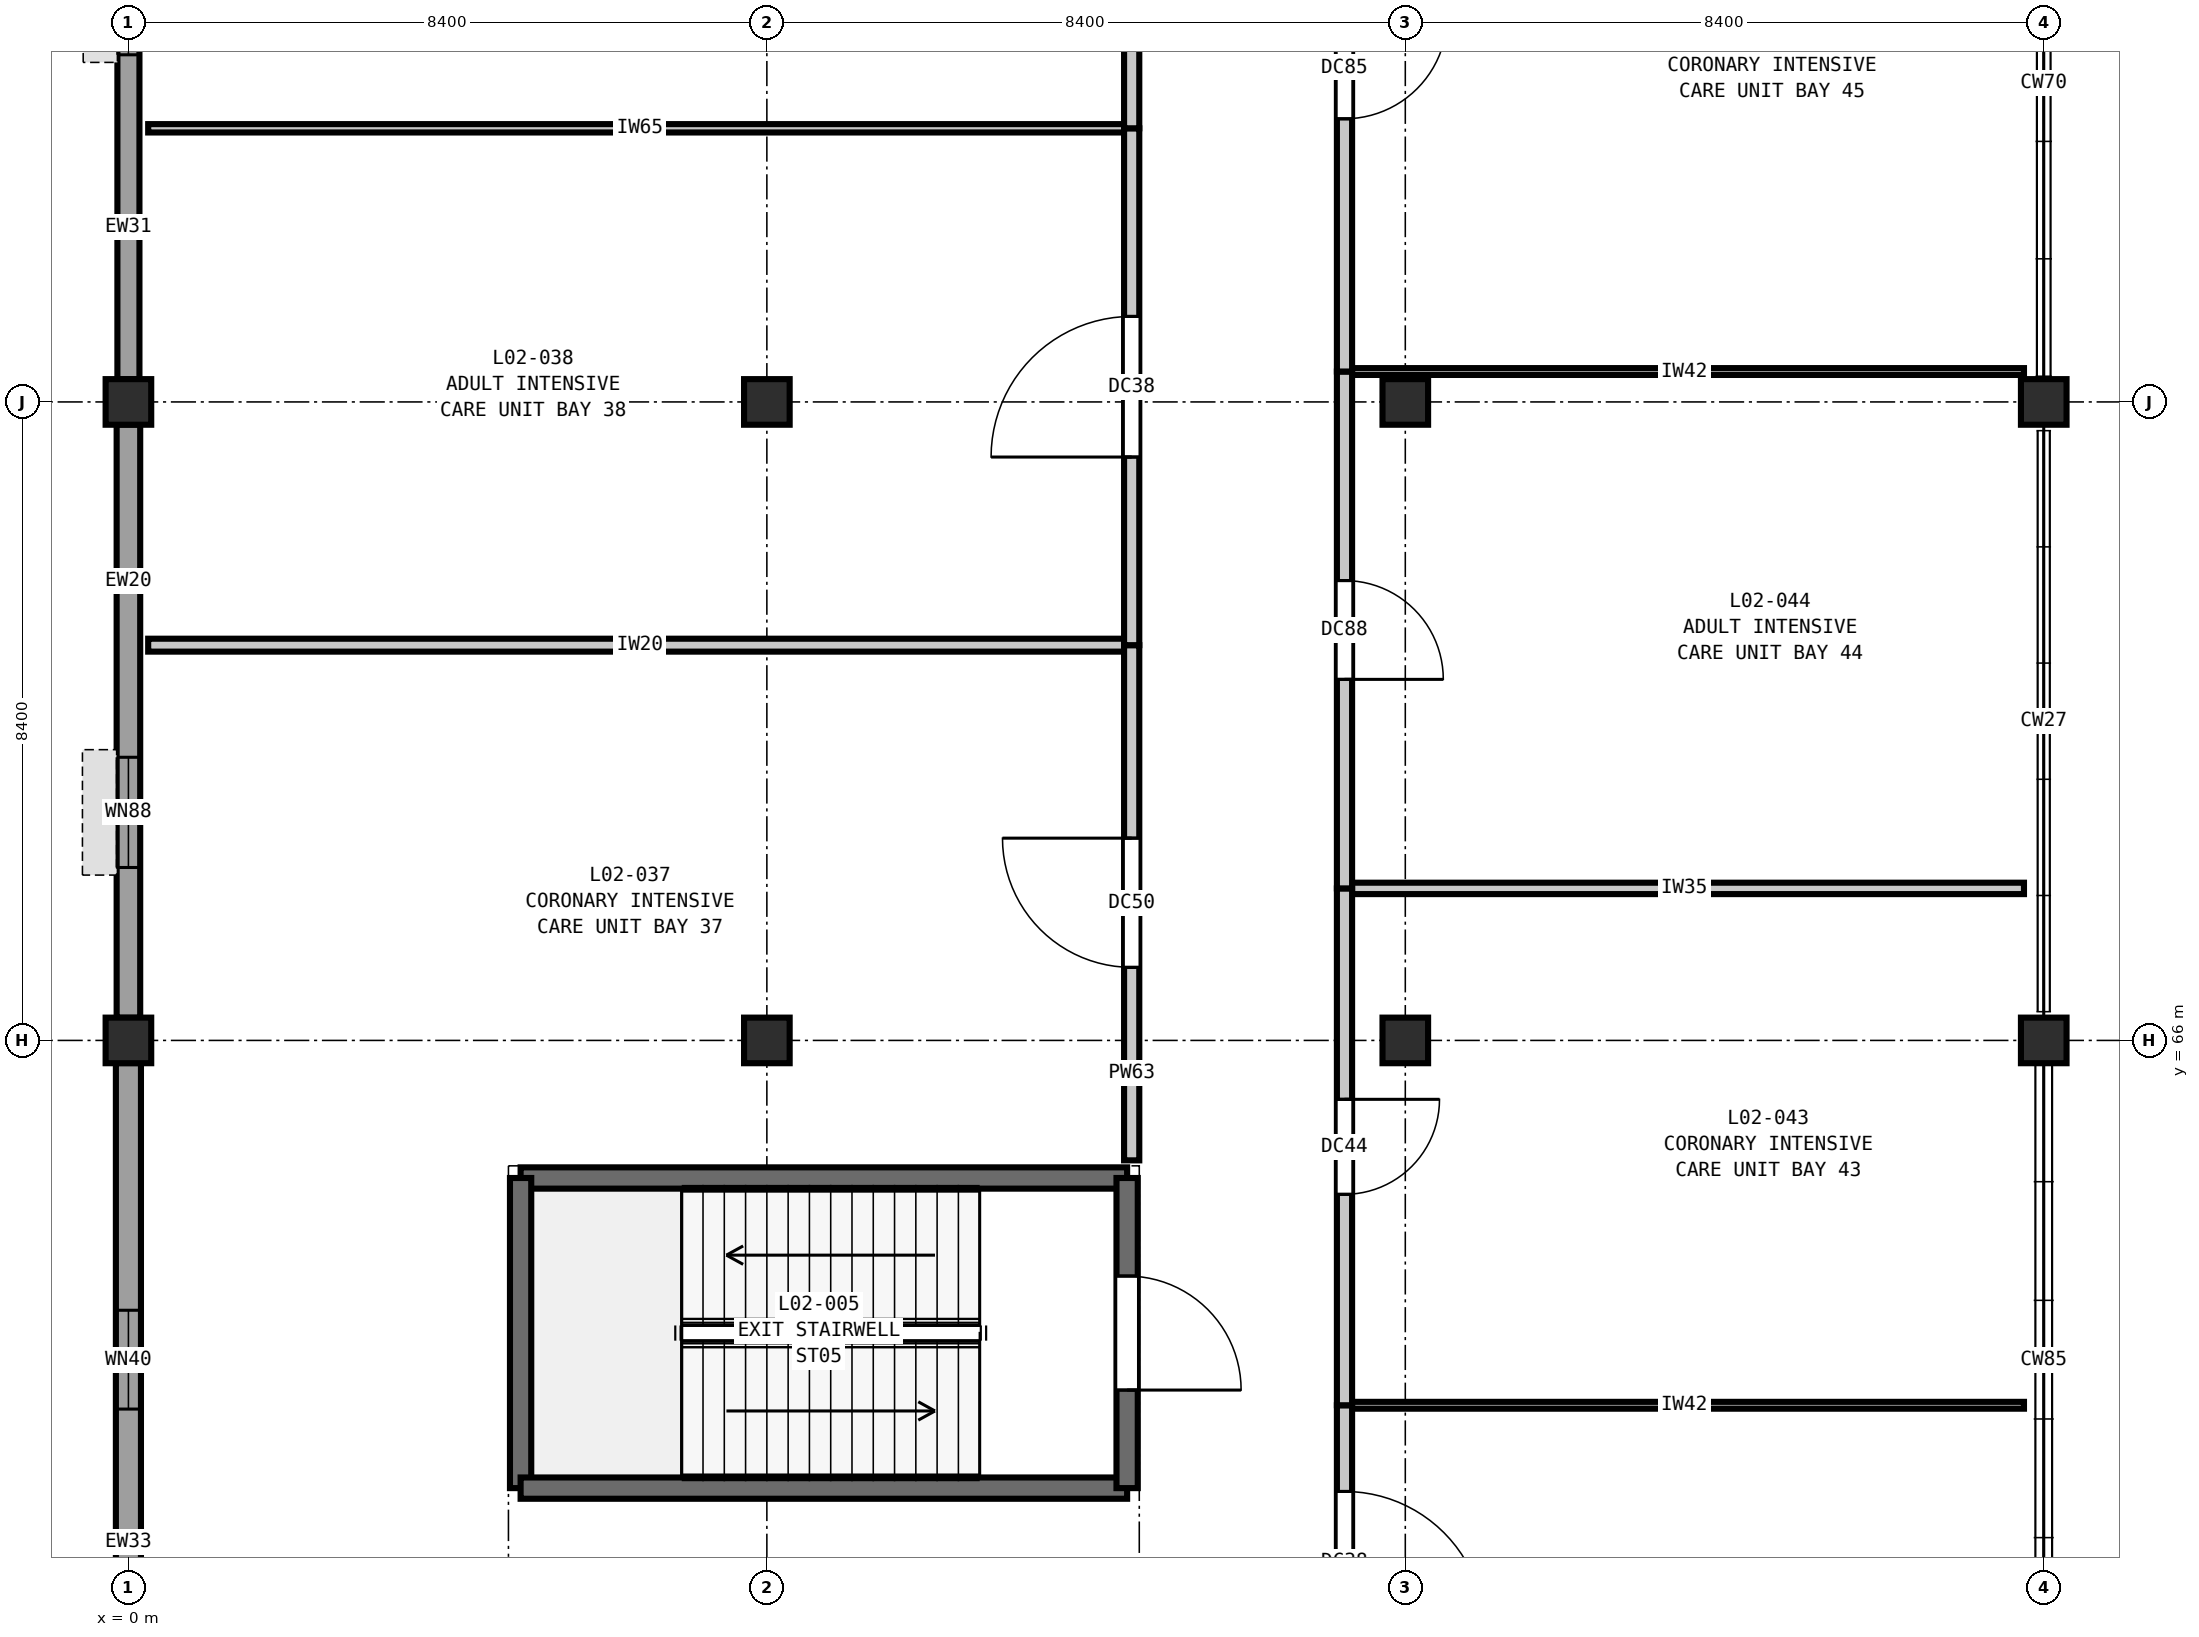
"""IFC4 building model, lengths in metres.
Left out: names, types, materials, properties, quantities, classifications, styles, units other than length and angle.
Written with IfcOpenShell. Run it as: python <this file> out.ifc"""

import sys

from ifc_helpers import new_model, si_unit, direction, frame, frame_2d, origin, origin_2d, place, context, subcontext, project, spatial, rectangle, extrude, element, fill, save


model = new_model("IFC4")
c1 = context("Model", 3, precision=1e-05, world=origin(), true_north=direction((0.0, 1.0)))
c2 = subcontext(c1, "Body", "Model", "MODEL_VIEW")
j1 = project(units=[si_unit("LENGTHUNIT", "METRE"), si_unit("PLANEANGLEUNIT", "RADIAN")], contexts=[c1])
p1 = place(None, origin())
s1 = spatial("IfcSite", under=j1, at=p1, CompositionType="ELEMENT")
p2 = place(p1, origin())
s2 = spatial("IfcBuilding", under=s1, at=p2, CompositionType="ELEMENT")
p3 = place(p2, frame((0.0, 0.0, 10.8)))
s3 = spatial("IfcBuildingStorey", under=s2, at=p3, CompositionType="ELEMENT", Elevation=10.8)
for number, where, z_axis, x_axis in (
    (1, (0.0, 66.0, 0.0), (0.0, 0.0, 1.0), (1.0, 0.0, 0.0)),
    (2, (0.0, 74.4, 0.0), (0.0, 0.0, 1.0), (1.0, 0.0, 0.0)),
    (3, (8.4, 66.0, 0.0), (0.0, 0.0, 1.0), (1.0, 0.0, 0.0)),
    (4, (8.4, 74.4, 0.0), (0.0, 0.0, 1.0), (1.0, 0.0, 0.0)),
    (5, (16.8, 66.0, 0.0), (0.0, 0.0, 1.0), (1.0, 0.0, 0.0)),
    (6, (16.8, 74.4, 0.0), (0.0, 0.0, 1.0), (1.0, 0.0, 0.0)),
    (7, (25.2, 66.0, 0.0), (0.0, 0.0, 1.0), (1.0, 0.0, 0.0)),
    (8, (25.2, 74.4, 0.0), (0.0, 0.0, 1.0), (1.0, 0.0, 0.0)),
):
    element("IfcColumn", number, at=place(p3, frame(where, z_axis=z_axis, x_axis=x_axis)), inside=s3, PredefinedType="COLUMN", context=c2, shape_type="SweptSolid", body=[
        extrude(rectangle(XDim=0.6, YDim=0.6, at=origin_2d()), origin(), (0.0, 0.0, 1.0), 5.4),
    ])
p4 = place(p3, frame((0.0, 57.898, 0.0), z_axis=(0.0, 0.0, 1.0), x_axis=(0.0, 1.0, 0.0)))
e9 = element("IfcWall", 9, at=p4, inside=s3, PredefinedType="SOLIDWALL", context=c2, shape_type="SweptSolid", body=[
    extrude(rectangle(XDim=7.804, YDim=0.33, at=frame_2d((3.902, 0.0))), origin(), (0.0, 0.0, 1.0), 4.68),
])
p5 = place(p4, frame((3.252, 0.0, 0.9)))
e10 = element("IfcOpeningElement", 10, at=p5, cuts=e9, PredefinedType="OPENING", context=c2, shape_type="SweptSolid", body=[
    extrude(rectangle(XDim=1.3, YDim=1.75, at=frame_2d((0.65, 0.875))), frame((0.0, 0.175, 0.0), z_axis=(0.0, -1.0, 0.0), x_axis=(1.0, 0.0, 0.0)), (0.0, 0.0, 1.0), 0.35),
])
p6 = place(p3, frame((0.0, 66.298, 0.0), z_axis=(0.0, 0.0, 1.0), x_axis=(0.0, 1.0, 0.0)))
e11 = element("IfcWall", 11, at=p6, inside=s3, PredefinedType="SOLIDWALL", context=c2, shape_type="SweptSolid", body=[
    extrude(rectangle(XDim=7.804, YDim=0.31, at=frame_2d((3.902, 0.0))), origin(), (0.0, 0.0, 1.0), 4.68),
])
p7 = place(p6, frame((1.977, 0.0, 0.9)))
e12 = element("IfcOpeningElement", 12, at=p7, cuts=e11, PredefinedType="OPENING", context=c2, shape_type="SweptSolid", body=[
    extrude(rectangle(XDim=1.45, YDim=1.75, at=frame_2d((0.725, 0.875))), frame((0.0, 0.165, 0.0), z_axis=(0.0, -1.0, 0.0), x_axis=(1.0, 0.0, 0.0)), (0.0, 0.0, 1.0), 0.33),
])
p8 = place(p3, frame((0.0, 74.698, 0.0), z_axis=(0.0, 0.0, 1.0), x_axis=(0.0, 1.0, 0.0)))
e13 = element("IfcWall", 13, at=p8, inside=s3, PredefinedType="SOLIDWALL", context=c2, shape_type="SweptSolid", body=[
    extrude(rectangle(XDim=7.804, YDim=0.29, at=frame_2d((3.902, 0.0))), origin(), (0.0, 0.0, 1.0), 4.68),
])
p9 = place(p8, frame((4.269, 0.0, 0.9)))
e14 = element("IfcOpeningElement", 14, at=p9, cuts=e13, PredefinedType="OPENING", context=c2, shape_type="SweptSolid", body=[
    extrude(rectangle(XDim=1.6, YDim=1.75, at=frame_2d((0.8, 0.875))), frame((0.0, 0.155, 0.0), z_axis=(0.0, -1.0, 0.0), x_axis=(1.0, 0.0, 0.0)), (0.0, 0.0, 1.0), 0.31),
])
p10 = place(p3, frame((13.14, 64.19, 0.0), z_axis=(0.0, 0.0, 1.0), x_axis=(-1.0, 0.0, 0.0)))
e15 = element("IfcWall", 15, at=p10, inside=s3, PredefinedType="SHEAR", context=c2, shape_type="SweptSolid", body=[
    extrude(rectangle(XDim=7.98, YDim=0.28, at=frame_2d((3.99, 0.0))), origin(), (0.0, 0.0, 1.0), 5.4),
])
p11 = place(p3, frame((5.16, 64.19, 0.0), z_axis=(0.0, 0.0, 1.0), x_axis=(0.0, -1.0, 0.0)))
e16 = element("IfcWall", 16, at=p11, inside=s3, PredefinedType="SHEAR", context=c2, shape_type="SweptSolid", body=[
    extrude(rectangle(XDim=4.08, YDim=0.28, at=frame_2d((2.04, 0.0))), origin(), (0.0, 0.0, 1.0), 5.4),
])
p12 = place(p3, frame((5.16, 60.11, 0.0), z_axis=(0.0, 0.0, 1.0), x_axis=(1.0, 0.0, 0.0)))
e17 = element("IfcWall", 17, at=p12, inside=s3, PredefinedType="SHEAR", context=c2, shape_type="SweptSolid", body=[
    extrude(rectangle(XDim=7.98, YDim=0.28, at=frame_2d((3.99, 0.0))), origin(), (0.0, 0.0, 1.0), 5.4),
])
p13 = place(p3, frame((13.14, 60.11, 0.0), z_axis=(0.0, 0.0, 1.0), x_axis=(0.0, 1.0, 0.0)))
e18 = element("IfcWall", 18, at=p13, inside=s3, PredefinedType="SHEAR", context=c2, shape_type="SweptSolid", body=[
    extrude(rectangle(XDim=4.08, YDim=0.28, at=frame_2d((2.04, 0.0))), origin(), (0.0, 0.0, 1.0), 5.4),
])
p14 = place(p13, frame((1.29, 0.0, 0.0)))
e19 = element("IfcOpeningElement", 19, at=p14, cuts=e18, PredefinedType="OPENING", context=c2, shape_type="SweptSolid", body=[
    extrude(rectangle(XDim=1.5, YDim=2.2, at=frame_2d((0.75, 1.1))), frame((0.0, 0.15, 0.0), z_axis=(0.0, -1.0, 0.0), x_axis=(1.0, 0.0, 0.0)), (0.0, 0.0, 1.0), 0.3),
])
p15 = place(p3, frame((16.0, 61.2, 0.0), z_axis=(0.0, 0.0, 1.0), x_axis=(1.0, 0.0, 0.0)))
e20 = element("IfcWall", 20, at=p15, inside=s3, PredefinedType="PARTITIONING", context=c2, shape_type="SweptSolid", body=[
    extrude(rectangle(XDim=8.94, YDim=0.09, at=frame_2d((4.47, 0.0))), origin(), (0.0, 0.0, 1.0), 5.07),
])
p16 = place(p3, frame((16.0, 68.0, 0.0), z_axis=(0.0, 0.0, 1.0), x_axis=(1.0, 0.0, 0.0)))
e21 = element("IfcWall", 21, at=p16, inside=s3, PredefinedType="PARTITIONING", context=c2, shape_type="SweptSolid", body=[
    extrude(rectangle(XDim=8.94, YDim=0.15, at=frame_2d((4.47, 0.0))), origin(), (0.0, 0.0, 1.0), 5.07),
])
p17 = place(p3, frame((0.26, 71.2, 0.0), z_axis=(0.0, 0.0, 1.0), x_axis=(1.0, 0.0, 0.0)))
e22 = element("IfcWall", 22, at=p17, inside=s3, PredefinedType="PARTITIONING", context=c2, shape_type="SweptSolid", body=[
    extrude(rectangle(XDim=12.94, YDim=0.17, at=frame_2d((6.47, 0.0))), origin(), (0.0, 0.0, 1.0), 5.07),
])
p18 = place(p3, frame((16.0, 74.8, 0.0), z_axis=(0.0, 0.0, 1.0), x_axis=(1.0, 0.0, 0.0)))
e23 = element("IfcWall", 23, at=p18, inside=s3, PredefinedType="PARTITIONING", context=c2, shape_type="SweptSolid", body=[
    extrude(rectangle(XDim=8.94, YDim=0.09, at=frame_2d((4.47, 0.0))), origin(), (0.0, 0.0, 1.0), 5.07),
])
p19 = place(p3, frame((0.26, 78.0, 0.0), z_axis=(0.0, 0.0, 1.0), x_axis=(1.0, 0.0, 0.0)))
e24 = element("IfcWall", 24, at=p19, inside=s3, PredefinedType="PARTITIONING", context=c2, shape_type="SweptSolid", body=[
    extrude(rectangle(XDim=12.94, YDim=0.11, at=frame_2d((6.47, 0.0))), origin(), (0.0, 0.0, 1.0), 5.07),
])
p20 = place(p3, frame((13.2, 64.422, 0.0), z_axis=(0.0, 0.0, 1.0), x_axis=(0.0, 1.0, 0.0)))
e25 = element("IfcWall", 25, at=p20, inside=s3, PredefinedType="PARTITIONING", context=c2, shape_type="SweptSolid", body=[
    extrude(rectangle(XDim=6.778, YDim=0.2, at=frame_2d((3.389, 0.0))), origin(), (0.0, 0.0, 1.0), 5.07),
])
p21 = place(p20, frame((2.539, 0.0, 0.0)))
e26 = element("IfcOpeningElement", 26, at=p21, cuts=e25, PredefinedType="OPENING", context=c2, shape_type="SweptSolid", body=[
    extrude(rectangle(XDim=1.7, YDim=2.3, at=frame_2d((0.85, 1.15))), frame((0.0, 0.11, 0.0), z_axis=(0.0, -1.0, 0.0), x_axis=(1.0, 0.0, 0.0)), (0.0, 0.0, 1.0), 0.22),
])
p22 = place(p3, frame((13.2, 71.2, 0.0), z_axis=(0.0, 0.0, 1.0), x_axis=(0.0, 1.0, 0.0)))
e27 = element("IfcWall", 27, at=p22, inside=s3, PredefinedType="PARTITIONING", context=c2, shape_type="SweptSolid", body=[
    extrude(rectangle(XDim=6.8, YDim=0.2, at=frame_2d((3.4, 0.0))), origin(), (0.0, 0.0, 1.0), 5.07),
])
p23 = place(p22, frame((2.475, 0.0, 0.0)))
e28 = element("IfcOpeningElement", 28, at=p23, cuts=e27, PredefinedType="OPENING", context=c2, shape_type="SweptSolid", body=[
    extrude(rectangle(XDim=1.85, YDim=2.3, at=frame_2d((0.925, 1.15))), frame((0.0, 0.11, 0.0), z_axis=(0.0, -1.0, 0.0), x_axis=(1.0, 0.0, 0.0)), (0.0, 0.0, 1.0), 0.22),
])
p24 = place(p3, frame((13.2, 78.0, 0.0), z_axis=(0.0, 0.0, 1.0), x_axis=(0.0, 1.0, 0.0)))
e29 = element("IfcWall", 29, at=p24, inside=s3, PredefinedType="PARTITIONING", context=c2, shape_type="SweptSolid", body=[
    extrude(rectangle(XDim=4.8, YDim=0.2, at=frame_2d((2.4, 0.0))), origin(), (0.0, 0.0, 1.0), 5.07),
])
p25 = place(p24, frame((1.775, 0.0, 0.0)))
e30 = element("IfcOpeningElement", 30, at=p25, cuts=e29, PredefinedType="OPENING", context=c2, shape_type="SweptSolid", body=[
    extrude(rectangle(XDim=1.25, YDim=2.15, at=frame_2d((0.625, 1.075))), frame((0.0, 0.11, 0.0), z_axis=(0.0, -1.0, 0.0), x_axis=(1.0, 0.0, 0.0)), (0.0, 0.0, 1.0), 0.22),
])
p26 = place(p3, frame((16.0, 54.4, 0.0), z_axis=(0.0, 0.0, 1.0), x_axis=(0.0, 1.0, 0.0)))
e31 = element("IfcWall", 31, at=p26, inside=s3, PredefinedType="PARTITIONING", context=c2, shape_type="SweptSolid", body=[
    extrude(rectangle(XDim=6.8, YDim=0.2, at=frame_2d((3.4, 0.0))), origin(), (0.0, 0.0, 1.0), 5.07),
])
p27 = place(p26, frame((3.816, 0.0, 0.0)))
e32 = element("IfcOpeningElement", 32, at=p27, cuts=e31, PredefinedType="OPENING", context=c2, shape_type="SweptSolid", body=[
    extrude(rectangle(XDim=1.85, YDim=2.3, at=frame_2d((0.925, 1.15))), frame((0.0, 0.11, 0.0), z_axis=(0.0, -1.0, 0.0), x_axis=(1.0, 0.0, 0.0)), (0.0, 0.0, 1.0), 0.22),
])
p28 = place(p3, frame((16.0, 61.2, 0.0), z_axis=(0.0, 0.0, 1.0), x_axis=(0.0, 1.0, 0.0)))
e33 = element("IfcWall", 33, at=p28, inside=s3, PredefinedType="PARTITIONING", context=c2, shape_type="SweptSolid", body=[
    extrude(rectangle(XDim=6.8, YDim=0.2, at=frame_2d((3.4, 0.0))), origin(), (0.0, 0.0, 1.0), 5.07),
])
p29 = place(p28, frame((2.775, 0.0, 0.0)))
e34 = element("IfcOpeningElement", 34, at=p29, cuts=e33, PredefinedType="OPENING", context=c2, shape_type="SweptSolid", body=[
    extrude(rectangle(XDim=1.25, YDim=2.15, at=frame_2d((0.625, 1.075))), frame((0.0, 0.11, 0.0), z_axis=(0.0, -1.0, 0.0), x_axis=(1.0, 0.0, 0.0)), (0.0, 0.0, 1.0), 0.22),
])
p30 = place(p3, frame((16.0, 68.0, 0.0), z_axis=(0.0, 0.0, 1.0), x_axis=(0.0, 1.0, 0.0)))
e35 = element("IfcWall", 35, at=p30, inside=s3, PredefinedType="PARTITIONING", context=c2, shape_type="SweptSolid", body=[
    extrude(rectangle(XDim=6.8, YDim=0.2, at=frame_2d((3.4, 0.0))), origin(), (0.0, 0.0, 1.0), 5.07),
])
p31 = place(p30, frame((2.75, 0.0, 0.0)))
e36 = element("IfcOpeningElement", 36, at=p31, cuts=e35, PredefinedType="OPENING", context=c2, shape_type="SweptSolid", body=[
    extrude(rectangle(XDim=1.3, YDim=2.2, at=frame_2d((0.65, 1.1))), frame((0.0, 0.11, 0.0), z_axis=(0.0, -1.0, 0.0), x_axis=(1.0, 0.0, 0.0)), (0.0, 0.0, 1.0), 0.22),
])
p32 = place(p3, frame((16.0, 74.8, 0.0), z_axis=(0.0, 0.0, 1.0), x_axis=(0.0, 1.0, 0.0)))
e37 = element("IfcWall", 37, at=p32, inside=s3, PredefinedType="PARTITIONING", context=c2, shape_type="SweptSolid", body=[
    extrude(rectangle(XDim=8.0, YDim=0.2, at=frame_2d((4.0, 0.0))), origin(), (0.0, 0.0, 1.0), 5.07),
])
p33 = place(p32, frame((3.325, 0.0, 0.0)))
e38 = element("IfcOpeningElement", 38, at=p33, cuts=e37, PredefinedType="OPENING", context=c2, shape_type="SweptSolid", body=[
    extrude(rectangle(XDim=1.35, YDim=2.2, at=frame_2d((0.675, 1.1))), frame((0.0, 0.11, 0.0), z_axis=(0.0, -1.0, 0.0), x_axis=(1.0, 0.0, 0.0)), (0.0, 0.0, 1.0), 0.22),
])
p34 = place(p5, origin())
e39 = element("IfcWindow", 39, at=p34, inside=s3, PartitioningType="SINGLE_PANEL", PredefinedType="WINDOW", context=c2, shape_type="SweptSolid", body=[
    extrude(rectangle(XDim=1.3, YDim=1.75, at=frame_2d((0.65, 0.875))), frame((0.0, 0.03, 0.0), z_axis=(0.0, -1.0, 0.0), x_axis=(1.0, 0.0, 0.0)), (0.0, 0.0, 1.0), 0.06),
])
fill(e10, e39)
p35 = place(p7, origin())
e40 = element("IfcWindow", 40, at=p35, inside=s3, PartitioningType="SINGLE_PANEL", PredefinedType="WINDOW", context=c2, shape_type="SweptSolid", body=[
    extrude(rectangle(XDim=1.45, YDim=1.75, at=frame_2d((0.725, 0.875))), frame((0.0, 0.03, 0.0), z_axis=(0.0, -1.0, 0.0), x_axis=(1.0, 0.0, 0.0)), (0.0, 0.0, 1.0), 0.06),
])
fill(e12, e40)
p36 = place(p9, origin())
e41 = element("IfcWindow", 41, at=p36, inside=s3, PartitioningType="DOUBLE_PANEL_VERTICAL", PredefinedType="WINDOW", context=c2, shape_type="SweptSolid", body=[
    extrude(rectangle(XDim=1.6, YDim=1.75, at=frame_2d((0.8, 0.875))), frame((0.0, 0.03, 0.0), z_axis=(0.0, -1.0, 0.0), x_axis=(1.0, 0.0, 0.0)), (0.0, 0.0, 1.0), 0.06),
])
fill(e14, e41)
p37 = place(p14, frame((1.5, 0.0, 0.0), z_axis=(0.0, 0.0, 1.0), x_axis=(-1.0, 0.0, 0.0)))
e42 = element("IfcDoor", 42, at=p37, inside=s3, OperationType="SINGLE_SWING_RIGHT", PredefinedType="DOOR", context=c2, shape_type="SweptSolid", body=[
    extrude(rectangle(XDim=1.5, YDim=2.2, at=frame_2d((0.75, 1.1))), frame((0.0, 0.025, 0.0), z_axis=(0.0, -1.0, 0.0), x_axis=(1.0, 0.0, 0.0)), (0.0, 0.0, 1.0), 0.05),
])
fill(e19, e42)
p38 = place(p21, origin())
e43 = element("IfcDoor", 43, at=p38, inside=s3, OperationType="SINGLE_SWING_RIGHT", PredefinedType="DOOR", context=c2, shape_type="SweptSolid", body=[
    extrude(rectangle(XDim=1.7, YDim=2.3, at=frame_2d((0.85, 1.15))), frame((0.0, 0.025, 0.0), z_axis=(0.0, -1.0, 0.0), x_axis=(1.0, 0.0, 0.0)), (0.0, 0.0, 1.0), 0.05),
])
fill(e26, e43)
p39 = place(p23, origin())
e44 = element("IfcDoor", 44, at=p39, inside=s3, OperationType="SINGLE_SWING_LEFT", PredefinedType="DOOR", context=c2, shape_type="SweptSolid", body=[
    extrude(rectangle(XDim=1.85, YDim=2.3, at=frame_2d((0.925, 1.15))), frame((0.0, 0.025, 0.0), z_axis=(0.0, -1.0, 0.0), x_axis=(1.0, 0.0, 0.0)), (0.0, 0.0, 1.0), 0.05),
])
fill(e28, e44)
p40 = place(p27, frame((1.85, 0.0, 0.0), z_axis=(0.0, 0.0, 1.0), x_axis=(-1.0, 0.0, 0.0)))
e45 = element("IfcDoor", 45, at=p40, inside=s3, OperationType="SINGLE_SWING_RIGHT", PredefinedType="DOOR", context=c2, shape_type="SweptSolid", body=[
    extrude(rectangle(XDim=1.85, YDim=2.3, at=frame_2d((0.925, 1.15))), frame((0.0, 0.025, 0.0), z_axis=(0.0, -1.0, 0.0), x_axis=(1.0, 0.0, 0.0)), (0.0, 0.0, 1.0), 0.05),
])
fill(e32, e45)
p41 = place(p29, frame((1.25, 0.0, 0.0), z_axis=(0.0, 0.0, 1.0), x_axis=(-1.0, 0.0, 0.0)))
e46 = element("IfcDoor", 46, at=p41, inside=s3, OperationType="SINGLE_SWING_LEFT", PredefinedType="DOOR", context=c2, shape_type="SweptSolid", body=[
    extrude(rectangle(XDim=1.25, YDim=2.15, at=frame_2d((0.625, 1.075))), frame((0.0, 0.025, 0.0), z_axis=(0.0, -1.0, 0.0), x_axis=(1.0, 0.0, 0.0)), (0.0, 0.0, 1.0), 0.05),
])
fill(e34, e46)
p42 = place(p31, frame((1.3, 0.0, 0.0), z_axis=(0.0, 0.0, 1.0), x_axis=(-1.0, 0.0, 0.0)))
e47 = element("IfcDoor", 47, at=p42, inside=s3, OperationType="SINGLE_SWING_RIGHT", PredefinedType="DOOR", context=c2, shape_type="SweptSolid", body=[
    extrude(rectangle(XDim=1.3, YDim=2.2, at=frame_2d((0.65, 1.1))), frame((0.0, 0.025, 0.0), z_axis=(0.0, -1.0, 0.0), x_axis=(1.0, 0.0, 0.0)), (0.0, 0.0, 1.0), 0.05),
])
fill(e36, e47)
p43 = place(p33, frame((1.35, 0.0, 0.0), z_axis=(0.0, 0.0, 1.0), x_axis=(-1.0, 0.0, 0.0)))
e48 = element("IfcDoor", 48, at=p43, inside=s3, OperationType="SINGLE_SWING_LEFT", PredefinedType="DOOR", context=c2, shape_type="SweptSolid", body=[
    extrude(rectangle(XDim=1.35, YDim=2.2, at=frame_2d((0.675, 1.1))), frame((0.0, 0.025, 0.0), z_axis=(0.0, -1.0, 0.0), x_axis=(1.0, 0.0, 0.0)), (0.0, 0.0, 1.0), 0.05),
])
fill(e38, e48)
save(model, sys.argv[1])
